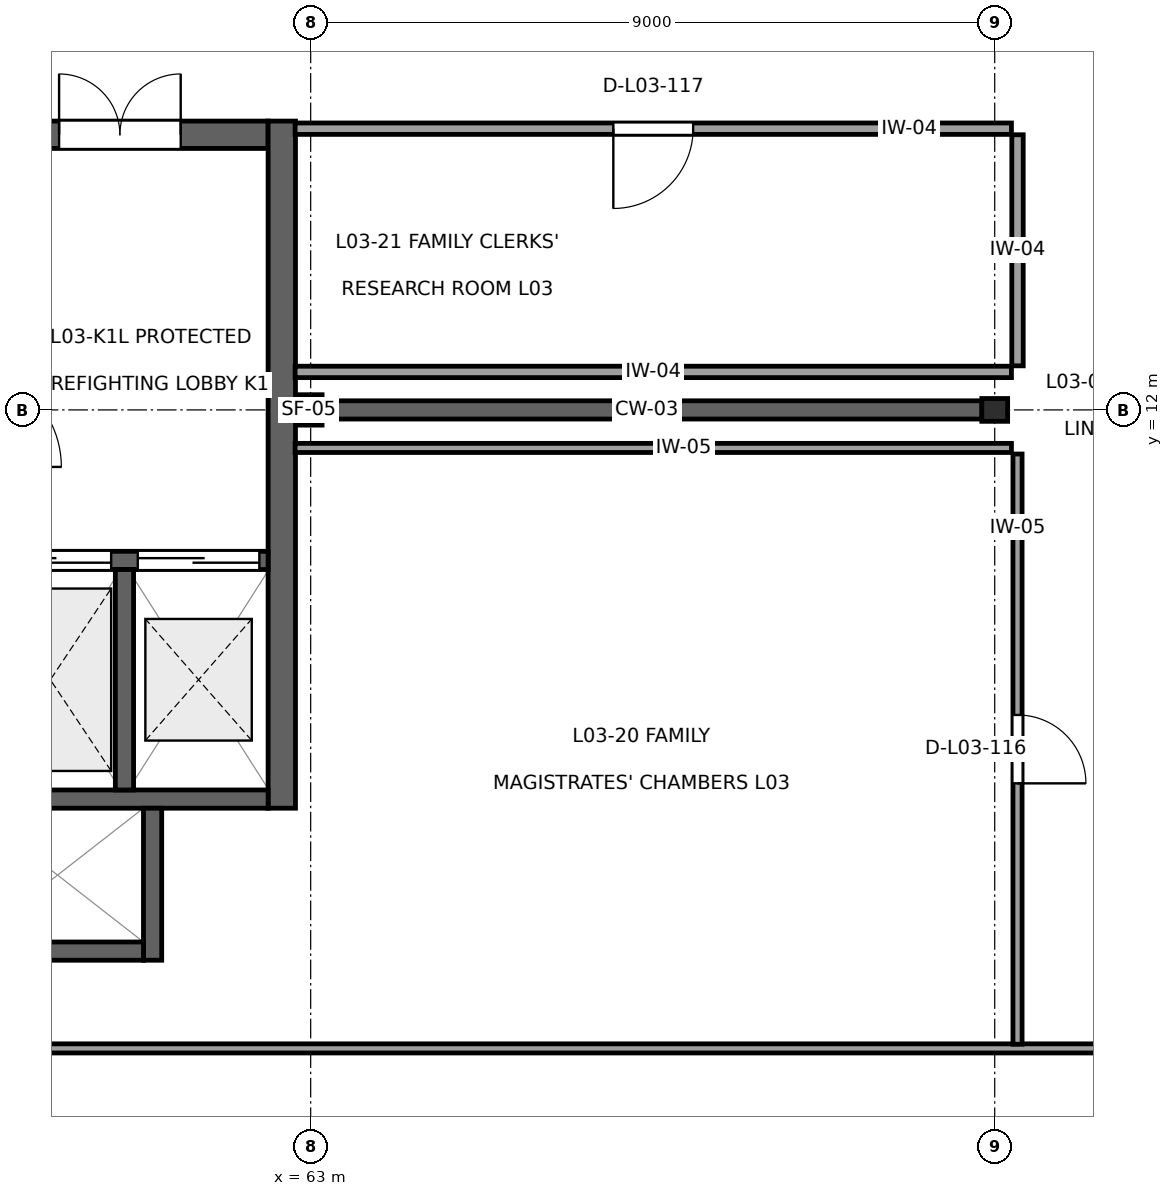
"""IFC4 building model, lengths in metres.
Left out: names, types, materials, properties, quantities, classifications, styles, units other than length and angle.
Written with IfcOpenShell. Run it as: python <this file> out.ifc"""

import sys

from ifc_helpers import new_model, si_unit, direction, frame, frame_2d, origin, origin_2d, place, context, subcontext, project, spatial, rectangle, i_section, extrude, element, fill, save


model = new_model("IFC4")
c1 = context("Model", 3, precision=1e-05, world=origin(), true_north=direction((0.0, 1.0)))
c2 = subcontext(c1, "Body", "Model", "MODEL_VIEW")
j1 = project(units=[si_unit("LENGTHUNIT", "METRE"), si_unit("PLANEANGLEUNIT", "RADIAN")], contexts=[c1])
p1 = place(None, origin())
s1 = spatial("IfcSite", under=j1, at=p1, CompositionType="ELEMENT")
p2 = place(p1, origin())
s2 = spatial("IfcBuilding", under=s1, at=p2, CompositionType="ELEMENT")
p3 = place(p2, frame((0.0, 0.0, 14.4)))
s3 = spatial("IfcBuildingStorey", under=s2, at=p3, CompositionType="ELEMENT", Elevation=14.4)
p4 = place(p3, frame((63.0, 12.0, 0.0), z_axis=(0.0, 0.0, 1.0), x_axis=(1.0, 0.0, 0.0)))
e1 = element("IfcColumn", 1, at=p4, inside=s3, PredefinedType="COLUMN", context=c2, shape_type="SweptSolid", body=[
    extrude(i_section(OverallWidth=0.3, OverallDepth=0.4, WebThickness=0.013, FlangeThickness=0.024, at=origin_2d()), origin(), (0.0, 0.0, 1.0), 4.5),
])
p5 = place(p3, frame((72.0, 12.0, 0.0), z_axis=(0.0, 0.0, 1.0), x_axis=(0.0, 1.0, 0.0)))
e2 = element("IfcColumn", 2, at=p5, inside=s3, PredefinedType="COLUMN", context=c2, shape_type="SweptSolid", body=[
    extrude(i_section(OverallWidth=0.3, OverallDepth=0.34, WebThickness=0.012, FlangeThickness=0.021, at=origin_2d()), origin(), (0.0, 0.0, 1.0), 4.5),
])
p6 = place(p3, frame((58.54, 15.62, 0.0), z_axis=(0.0, 0.0, 1.0), x_axis=(1.0, 0.0, 0.0)))
e3 = element("IfcWall", 3, at=p6, inside=s3, PredefinedType="SHEAR", context=c2, shape_type="SweptSolid", body=[
    extrude(rectangle(XDim=3.9, YDim=0.36, at=frame_2d((1.95, 0.0))), origin(), (0.0, 0.0, 1.0), 4.16),
])
p7 = place(p6, frame((1.15, 0.0, 0.0)))
e4 = element("IfcOpeningElement", 4, at=p7, cuts=e3, PredefinedType="OPENING", context=c2, shape_type="SweptSolid", body=[
    extrude(rectangle(XDim=1.6, YDim=2.25, at=frame_2d((0.8, 1.125))), frame((0.0, 0.195, 0.0), z_axis=(0.0, -1.0, 0.0), x_axis=(1.0, 0.0, 0.0)), (0.0, 0.0, 1.0), 0.39),
])
p8 = place(p3, frame((62.62, 6.76, 0.0), z_axis=(0.0, 0.0, 1.0), x_axis=(0.0, 1.0, 0.0)))
e5 = element("IfcWall", 5, at=p8, inside=s3, PredefinedType="SHEAR", context=c2, shape_type="SweptSolid", body=[
    extrude(rectangle(XDim=9.04, YDim=0.36, at=frame_2d((4.52, 0.0))), origin(), (0.0, 0.0, 1.0), 4.16),
])
p9 = place(p3, frame((58.54, 10.02, 0.0), z_axis=(0.0, 0.0, 1.0), x_axis=(1.0, 0.0, 0.0)))
e6 = element("IfcWall", 6, at=p9, inside=s3, PredefinedType="SHEAR", context=c2, shape_type="SweptSolid", body=[
    extrude(rectangle(XDim=3.9, YDim=0.24, at=frame_2d((1.95, 0.0))), origin(), (0.0, 0.0, 1.0), 4.31),
])
p10 = place(p9, frame((0.235, 0.0, 0.0)))
e7 = element("IfcOpeningElement", 7, at=p10, cuts=e6, PredefinedType="OPENING", context=c2, shape_type="SweptSolid", body=[
    extrude(rectangle(XDim=1.6, YDim=2.3, at=frame_2d((0.8, 1.15))), frame((0.0, 0.135, 0.0), z_axis=(0.0, -1.0, 0.0), x_axis=(1.0, 0.0, 0.0)), (0.0, 0.0, 1.0), 0.27),
])
p11 = place(p9, frame((2.185, 0.0, 0.0)))
e8 = element("IfcOpeningElement", 8, at=p11, cuts=e6, PredefinedType="OPENING", context=c2, shape_type="SweptSolid", body=[
    extrude(rectangle(XDim=1.6, YDim=2.3, at=frame_2d((0.8, 1.15))), frame((0.0, 0.135, 0.0), z_axis=(0.0, -1.0, 0.0), x_axis=(1.0, 0.0, 0.0)), (0.0, 0.0, 1.0), 0.27),
])
p12 = place(p3, frame((58.54, 6.88, 0.0), z_axis=(0.0, 0.0, 1.0), x_axis=(1.0, 0.0, 0.0)))
e9 = element("IfcWall", 9, at=p12, inside=s3, PredefinedType="SHEAR", context=c2, shape_type="SweptSolid", body=[
    extrude(rectangle(XDim=3.9, YDim=0.24, at=frame_2d((1.95, 0.0))), origin(), (0.0, 0.0, 1.0), 4.31),
])
p13 = place(p3, frame((60.55, 7.0, 0.0), z_axis=(0.0, 0.0, 1.0), x_axis=(0.0, 1.0, 0.0)))
e10 = element("IfcWall", 10, at=p13, inside=s3, PredefinedType="SHEAR", context=c2, shape_type="SweptSolid", body=[
    extrude(rectangle(XDim=2.9, YDim=0.24, at=frame_2d((1.45, 0.0))), origin(), (0.0, 0.0, 1.0), 4.31),
])
p14 = place(p3, frame((60.92, 4.76, 0.0), z_axis=(0.0, 0.0, 1.0), x_axis=(0.0, 1.0, 0.0)))
e11 = element("IfcWall", 11, at=p14, inside=s3, PredefinedType="SHEAR", context=c2, shape_type="SweptSolid", body=[
    extrude(rectangle(XDim=2.0, YDim=0.24, at=frame_2d((1.0, 0.0))), origin(), (0.0, 0.0, 1.0), 4.31),
])
p15 = place(p3, frame((58.54, 4.88, 0.0), z_axis=(0.0, 0.0, 1.0), x_axis=(1.0, 0.0, 0.0)))
e12 = element("IfcWall", 12, at=p15, inside=s3, PredefinedType="SHEAR", context=c2, shape_type="SweptSolid", body=[
    extrude(rectangle(XDim=2.26, YDim=0.24, at=frame_2d((1.13, 0.0))), origin(), (0.0, 0.0, 1.0), 4.31),
])
p16 = place(p3, frame((63.008, 12.0, 0.0), z_axis=(0.0, 0.0, 1.0), x_axis=(1.0, 0.0, 0.0)))
e13 = element("IfcWall", 13, at=p16, inside=s3, PredefinedType="SHEAR", context=c2, shape_type="SweptSolid", body=[
    extrude(rectangle(XDim=8.824, YDim=0.24, at=frame_2d((4.412, 0.0))), origin(), (0.0, 0.0, 1.0), 3.575),
])
p17 = place(p3, frame((53.87, 3.6, 0.0), z_axis=(0.0, 0.0, 1.0), x_axis=(1.0, 0.0, 0.0)))
e14 = element("IfcWall", 14, at=p17, inside=s3, PredefinedType="PARTITIONING", context=c2, shape_type="SweptSolid", body=[
    extrude(rectangle(XDim=63.25, YDim=0.12, at=frame_2d((31.625, 0.0))), origin(), (0.0, 0.0, 1.0), 4.14),
])
p18 = place(p17, frame((19.855, 0.0, 0.0)))
e15 = element("IfcOpeningElement", 15, at=p18, cuts=e14, PredefinedType="OPENING", context=c2, shape_type="SweptSolid", body=[
    extrude(rectangle(XDim=0.95, YDim=2.15, at=frame_2d((0.475, 1.075))), frame((0.0, 0.075, 0.0), z_axis=(0.0, -1.0, 0.0), x_axis=(1.0, 0.0, 0.0)), (0.0, 0.0, 1.0), 0.15),
])
p19 = place(p3, frame((62.795, 11.5, 0.0), z_axis=(0.0, 0.0, 1.0), x_axis=(1.0, 0.0, 0.0)))
e16 = element("IfcWall", 16, at=p19, inside=s3, PredefinedType="PARTITIONING", context=c2, shape_type="SweptSolid", body=[
    extrude(rectangle(XDim=9.425, YDim=0.12, at=frame_2d((4.712, 0.0))), origin(), (0.0, 0.0, 1.0), 4.14),
])
p20 = place(p3, frame((72.3, 11.42, 0.0), z_axis=(0.0, 0.0, 1.0), x_axis=(0.0, -1.0, 0.0)))
e17 = element("IfcWall", 17, at=p20, inside=s3, PredefinedType="PARTITIONING", context=c2, shape_type="SweptSolid", body=[
    extrude(rectangle(XDim=7.765, YDim=0.12, at=frame_2d((3.882, 0.0))), origin(), (0.0, 0.0, 1.0), 4.14),
])
p21 = place(p20, frame((3.433, 0.0, 0.0)))
e18 = element("IfcOpeningElement", 18, at=p21, cuts=e17, PredefinedType="OPENING", context=c2, shape_type="SweptSolid", body=[
    extrude(rectangle(XDim=0.9, YDim=2.1, at=frame_2d((0.45, 1.05))), frame((0.0, 0.075, 0.0), z_axis=(0.0, -1.0, 0.0), x_axis=(1.0, 0.0, 0.0)), (0.0, 0.0, 1.0), 0.15),
])
p22 = place(p3, frame((62.795, 15.7, 0.0), z_axis=(0.0, 0.0, 1.0), x_axis=(1.0, 0.0, 0.0)))
e19 = element("IfcWall", 19, at=p22, inside=s3, PredefinedType="PARTITIONING", context=c2, shape_type="SweptSolid", body=[
    extrude(rectangle(XDim=9.425, YDim=0.15, at=frame_2d((4.712, 0.0))), origin(), (0.0, 0.0, 1.0), 4.14),
])
p23 = place(p22, frame((4.187, 0.0, 0.0)))
e20 = element("IfcOpeningElement", 20, at=p23, cuts=e19, PredefinedType="OPENING", context=c2, shape_type="SweptSolid", body=[
    extrude(rectangle(XDim=1.05, YDim=2.25, at=frame_2d((0.525, 1.125))), frame((0.0, 0.09, 0.0), z_axis=(0.0, -1.0, 0.0), x_axis=(1.0, 0.0, 0.0)), (0.0, 0.0, 1.0), 0.18),
])
p24 = place(p3, frame((72.3, 15.62, 0.0), z_axis=(0.0, 0.0, 1.0), x_axis=(0.0, -1.0, 0.0)))
e21 = element("IfcWall", 21, at=p24, inside=s3, PredefinedType="PARTITIONING", context=c2, shape_type="SweptSolid", body=[
    extrude(rectangle(XDim=3.04, YDim=0.15, at=frame_2d((1.52, 0.0))), origin(), (0.0, 0.0, 1.0), 4.14),
])
p25 = place(p3, frame((72.22, 12.5, 0.0), z_axis=(0.0, 0.0, 1.0), x_axis=(-1.0, 0.0, 0.0)))
e22 = element("IfcWall", 22, at=p25, inside=s3, PredefinedType="PARTITIONING", context=c2, shape_type="SweptSolid", body=[
    extrude(rectangle(XDim=9.425, YDim=0.15, at=frame_2d((4.712, 0.0))), origin(), (0.0, 0.0, 1.0), 4.14),
])
p26 = place(p7, origin())
e23 = element("IfcDoor", 23, at=p26, inside=s3, OperationType="DOUBLE_DOOR_SINGLE_SWING", PredefinedType="DOOR", context=c2, shape_type="SweptSolid", body=[
    extrude(rectangle(XDim=1.6, YDim=2.25, at=frame_2d((0.8, 1.125))), frame((0.0, 0.025, 0.0), z_axis=(0.0, -1.0, 0.0), x_axis=(1.0, 0.0, 0.0)), (0.0, 0.0, 1.0), 0.05),
])
fill(e4, e23)
p27 = place(p10, origin())
e24 = element("IfcDoor", 24, at=p27, inside=s3, OperationType="DOUBLE_DOOR_SLIDING", PredefinedType="DOOR", context=c2, shape_type="SweptSolid", body=[
    extrude(rectangle(XDim=1.6, YDim=2.3, at=frame_2d((0.8, 1.15))), frame((0.0, 0.025, 0.0), z_axis=(0.0, -1.0, 0.0), x_axis=(1.0, 0.0, 0.0)), (0.0, 0.0, 1.0), 0.05),
])
fill(e7, e24)
p28 = place(p11, origin())
e25 = element("IfcDoor", 25, at=p28, inside=s3, OperationType="DOUBLE_DOOR_SLIDING", PredefinedType="DOOR", context=c2, shape_type="SweptSolid", body=[
    extrude(rectangle(XDim=1.6, YDim=2.3, at=frame_2d((0.8, 1.15))), frame((0.0, 0.025, 0.0), z_axis=(0.0, -1.0, 0.0), x_axis=(1.0, 0.0, 0.0)), (0.0, 0.0, 1.0), 0.05),
])
fill(e8, e25)
p29 = place(p21, origin())
e26 = element("IfcDoor", 26, at=p29, inside=s3, OperationType="SINGLE_SWING_RIGHT", PredefinedType="DOOR", context=c2, shape_type="SweptSolid", body=[
    extrude(rectangle(XDim=0.9, YDim=2.1, at=frame_2d((0.45, 1.05))), frame((0.0, 0.025, 0.0), z_axis=(0.0, -1.0, 0.0), x_axis=(1.0, 0.0, 0.0)), (0.0, 0.0, 1.0), 0.05),
])
fill(e18, e26)
p30 = place(p23, frame((1.05, 0.0, 0.0), z_axis=(0.0, 0.0, 1.0), x_axis=(-1.0, 0.0, 0.0)))
e27 = element("IfcDoor", 27, at=p30, inside=s3, OperationType="SINGLE_SWING_LEFT", PredefinedType="DOOR", context=c2, shape_type="SweptSolid", body=[
    extrude(rectangle(XDim=1.05, YDim=2.25, at=frame_2d((0.525, 1.125))), frame((0.0, 0.025, 0.0), z_axis=(0.0, -1.0, 0.0), x_axis=(1.0, 0.0, 0.0)), (0.0, 0.0, 1.0), 0.05),
])
fill(e20, e27)
save(model, sys.argv[1])
